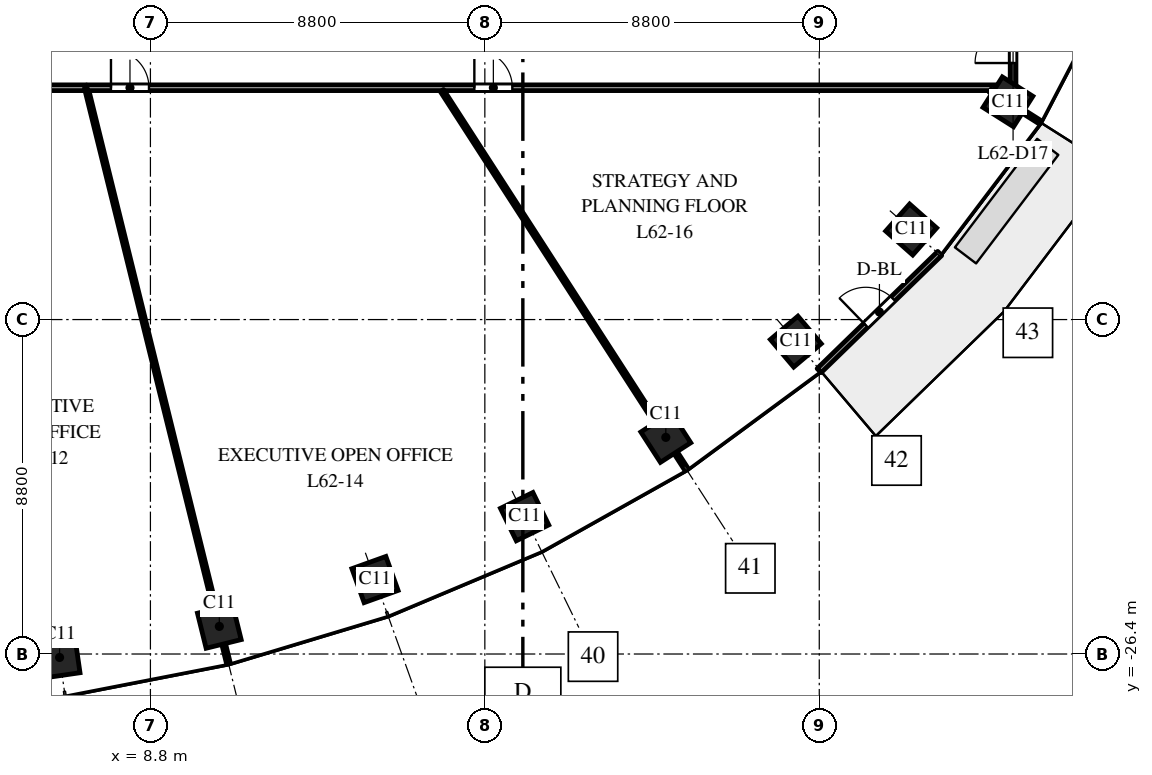
"""IFC4 building model, lengths in metres.
Left out: names, types, materials, properties, quantities, classifications, styles, units other than length and angle.
Written with IfcOpenShell. Run it as: python <this file> out.ifc"""

import sys

from ifc_helpers import new_model, si_unit, direction, frame, frame_2d, origin, origin_2d, place, context, subcontext, project, spatial, rectangle, extrude, element, fill, save


model = new_model("IFC4")
c1 = context("Model", 3, precision=1e-05, world=origin(), true_north=direction((0.0, 1.0)))
c2 = subcontext(c1, "Body", "Model", "MODEL_VIEW")
j1 = project(units=[si_unit("LENGTHUNIT", "METRE"), si_unit("PLANEANGLEUNIT", "RADIAN")], contexts=[c1])
p1 = place(None, origin())
s1 = spatial("IfcSite", under=j1, at=p1, CompositionType="ELEMENT")
p2 = place(p1, origin())
s2 = spatial("IfcBuilding", under=s1, at=p2, CompositionType="ELEMENT")
p3 = place(p2, frame((0.0, 0.0, 291.0)))
s3 = spatial("IfcBuildingStorey", under=s2, at=p3, CompositionType="ELEMENT", Elevation=291.0)
for number, where, z_axis, x_axis in (
    (1, (6.409, -26.491, 0.0), (0.0, 0.0, 1.0), (0.99, 0.143, 0.0)),
    (2, (10.613, -25.674, 0.0), (0.0, 0.0, 1.0), (0.971, 0.24, 0.0)),
    (3, (14.709, -24.441, 0.0), (0.0, 0.0, 1.0), (0.941, 0.338, 0.0)),
    (4, (18.646, -22.785, 0.0), (0.0, 0.0, 1.0), (0.898, 0.439, 0.0)),
    (5, (22.362, -20.7, 0.0), (0.0, 0.0, 1.0), (0.84, 0.542, 0.0)),
    (6, (25.783, -18.18, 0.0), (0.0, 0.0, 1.0), (0.763, 0.646, 0.0)),
    (7, (28.819, -15.23, 0.0), (0.0, 0.0, 1.0), (0.663, 0.749, 0.0)),
    (8, (31.365, -11.871, 0.0), (0.0, 0.0, 1.0), (0.535, 0.845, 0.0)),
):
    element("IfcColumn", number, at=place(p3, frame(where, z_axis=z_axis, x_axis=x_axis)), inside=s3, PredefinedType="COLUMN", context=c2, shape_type="SweptSolid", body=[
        extrude(rectangle(XDim=0.95, YDim=0.95, at=origin_2d()), origin(), (0.0, 0.0, 1.0), 4.0),
    ])
p4 = place(p3, frame((26.396, -18.943, 0.0), z_axis=(0.0, 0.0, 1.0), x_axis=(0.717214761864, 0.696852197647, 0.0)))
e9 = element("IfcWall", 9, at=p4, inside=s3, PredefinedType="STANDARD", context=c2, shape_type="SweptSolid", body=[
    extrude(rectangle(XDim=4.424, YDim=0.15, at=frame_2d((2.212, 0.0))), origin(), (0.0, 0.0, 1.0), 3.7),
])
p5 = place(p4, frame((1.712, 0.0, 0.0)))
e10 = element("IfcOpeningElement", 10, at=p5, cuts=e9, PredefinedType="OPENING", context=c2, shape_type="SweptSolid", body=[
    extrude(rectangle(XDim=1.0, YDim=2.4, at=frame_2d((0.5, 1.2))), frame((0.0, 0.085, 0.0), z_axis=(0.0, -1.0, 0.0), x_axis=(1.0, 0.0, 0.0)), (0.0, 0.0, 1.0), 0.17),
])
p6 = place(p3, frame((1.966, -11.5, 0.0), z_axis=(0.0, 0.0, 1.0), x_axis=(1.0, 0.0, 0.0)))
e11 = element("IfcWall", 11, at=p6, inside=s3, PredefinedType="PARTITIONING", context=c2, shape_type="SweptSolid", body=[
    extrude(rectangle(XDim=5.146, YDim=0.15, at=frame_2d((2.573, 0.0))), origin(), (0.0, 0.0, 1.0), 2.85),
])
p7 = place(p6, frame((0.567, 0.0, 0.0)))
e12 = element("IfcOpeningElement", 12, at=p7, cuts=e11, PredefinedType="OPENING", context=c2, shape_type="SweptSolid", body=[
    extrude(rectangle(XDim=1.0, YDim=2.1, at=frame_2d((0.5, 1.05))), frame((0.0, 0.085, 0.0), z_axis=(0.0, -1.0, 0.0), x_axis=(1.0, 0.0, 0.0)), (0.0, 0.0, 1.0), 0.17),
])
p8 = place(p3, frame((7.112, -11.5, 0.0), z_axis=(0.0, 0.0, 1.0), x_axis=(0.239787813873, -0.970825321218, 0.0)))
e13 = element("IfcWall", 13, at=p8, inside=s3, PredefinedType="PARTITIONING", context=c2, shape_type="SweptSolid", body=[
    extrude(rectangle(XDim=15.601, YDim=0.1, at=frame_2d((7.801, 0.0))), origin(), (0.0, 0.0, 1.0), 2.85),
])
p9 = place(p3, frame((7.129, -11.5, 0.0), z_axis=(0.0, 0.0, 1.0), x_axis=(1.0, 0.0, 0.0)))
e14 = element("IfcWall", 14, at=p9, inside=s3, PredefinedType="PARTITIONING", context=c2, shape_type="SweptSolid", body=[
    extrude(rectangle(XDim=24.371, YDim=0.15, at=frame_2d((12.186, 0.0))), origin(), (0.0, 0.0, 1.0), 2.75),
])
p10 = place(p9, frame((0.633, 0.0, 0.0)))
e15 = element("IfcOpeningElement", 15, at=p10, cuts=e14, PredefinedType="OPENING", context=c2, shape_type="SweptSolid", body=[
    extrude(rectangle(XDim=1.0, YDim=2.1, at=frame_2d((0.5, 1.05))), frame((0.0, 0.085, 0.0), z_axis=(0.0, -1.0, 0.0), x_axis=(1.0, 0.0, 0.0)), (0.0, 0.0, 1.0), 0.17),
])
p11 = place(p9, frame((10.195, 0.0, 0.0)))
e16 = element("IfcOpeningElement", 16, at=p11, cuts=e14, PredefinedType="OPENING", context=c2, shape_type="SweptSolid", body=[
    extrude(rectangle(XDim=1.0, YDim=2.1, at=frame_2d((0.5, 1.05))), frame((0.0, 0.085, 0.0), z_axis=(0.0, -1.0, 0.0), x_axis=(1.0, 0.0, 0.0)), (0.0, 0.0, 1.0), 0.17),
])
p12 = place(p3, frame((16.472, -11.575, 0.0), z_axis=(0.0, 0.0, 1.0), x_axis=(0.54229092728, -0.840190782019, 0.0)))
e17 = element("IfcWall", 17, at=p12, inside=s3, PredefinedType="PARTITIONING", context=c2, shape_type="SweptSolid", body=[
    extrude(rectangle(XDim=11.863, YDim=0.1, at=frame_2d((5.931, 0.0))), origin(), (0.0, 0.0, 1.0), 3.7),
])
p13 = place(p3, frame((30.897, -11.575, 0.0), z_axis=(0.0, 0.0, 1.0), x_axis=(0.844757626245, -0.535149094086, 0.0)))
e18 = element("IfcWall", 18, at=p13, inside=s3, PredefinedType="PARTITIONING", context=c2, shape_type="SweptSolid", body=[
    extrude(rectangle(XDim=1.557, YDim=0.1, at=frame_2d((0.778, 0.0))), origin(), (0.0, 0.0, 1.0), 3.0),
])
p14 = place(p3, frame((31.5, -11.5, 0.0), z_axis=(0.0, 0.0, 1.0), x_axis=(0.0, 1.0, 0.0)))
e19 = element("IfcWall", 19, at=p14, inside=s3, PredefinedType="PARTITIONING", context=c2, shape_type="SweptSolid", body=[
    extrude(rectangle(XDim=3.0, YDim=0.15, at=frame_2d((1.5, 0.0))), origin(), (0.0, 0.0, 1.0), 3.0),
])
p15 = place(p14, frame((0.65, 0.0, 0.0)))
e20 = element("IfcOpeningElement", 20, at=p15, cuts=e19, PredefinedType="OPENING", context=c2, shape_type="SweptSolid", body=[
    extrude(rectangle(XDim=1.0, YDim=2.1, at=frame_2d((0.5, 1.05))), frame((0.0, 0.085, 0.0), z_axis=(0.0, -1.0, 0.0), x_axis=(1.0, 0.0, 0.0)), (0.0, 0.0, 1.0), 0.17),
])
p16 = place(p5, origin())
e21 = element("IfcDoor", 21, at=p16, inside=s3, OperationType="SINGLE_SWING_LEFT", PredefinedType="DOOR", context=c2, shape_type="SweptSolid", body=[
    extrude(rectangle(XDim=1.0, YDim=2.4, at=frame_2d((0.5, 1.2))), frame((0.0, 0.025, 0.0), z_axis=(0.0, -1.0, 0.0), x_axis=(1.0, 0.0, 0.0)), (0.0, 0.0, 1.0), 0.05),
])
fill(e10, e21)
p17 = place(p10, origin())
e22 = element("IfcDoor", 22, at=p17, inside=s3, OperationType="SINGLE_SWING_LEFT", PredefinedType="DOOR", context=c2, shape_type="SweptSolid", body=[
    extrude(rectangle(XDim=1.0, YDim=2.1, at=frame_2d((0.5, 1.05))), frame((0.0, 0.025, 0.0), z_axis=(0.0, -1.0, 0.0), x_axis=(1.0, 0.0, 0.0)), (0.0, 0.0, 1.0), 0.05),
])
fill(e15, e22)
p18 = place(p11, origin())
e23 = element("IfcDoor", 23, at=p18, inside=s3, OperationType="SINGLE_SWING_LEFT", PredefinedType="DOOR", context=c2, shape_type="SweptSolid", body=[
    extrude(rectangle(XDim=1.0, YDim=2.1, at=frame_2d((0.5, 1.05))), frame((0.0, 0.025, 0.0), z_axis=(0.0, -1.0, 0.0), x_axis=(1.0, 0.0, 0.0)), (0.0, 0.0, 1.0), 0.05),
])
fill(e16, e23)
p19 = place(p15, origin())
e24 = element("IfcDoor", 24, at=p19, inside=s3, OperationType="SINGLE_SWING_LEFT", PredefinedType="DOOR", context=c2, shape_type="SweptSolid", body=[
    extrude(rectangle(XDim=1.0, YDim=2.1, at=frame_2d((0.5, 1.05))), frame((0.0, 0.025, 0.0), z_axis=(0.0, -1.0, 0.0), x_axis=(1.0, 0.0, 0.0)), (0.0, 0.0, 1.0), 0.05),
])
fill(e20, e24)
save(model, sys.argv[1])
